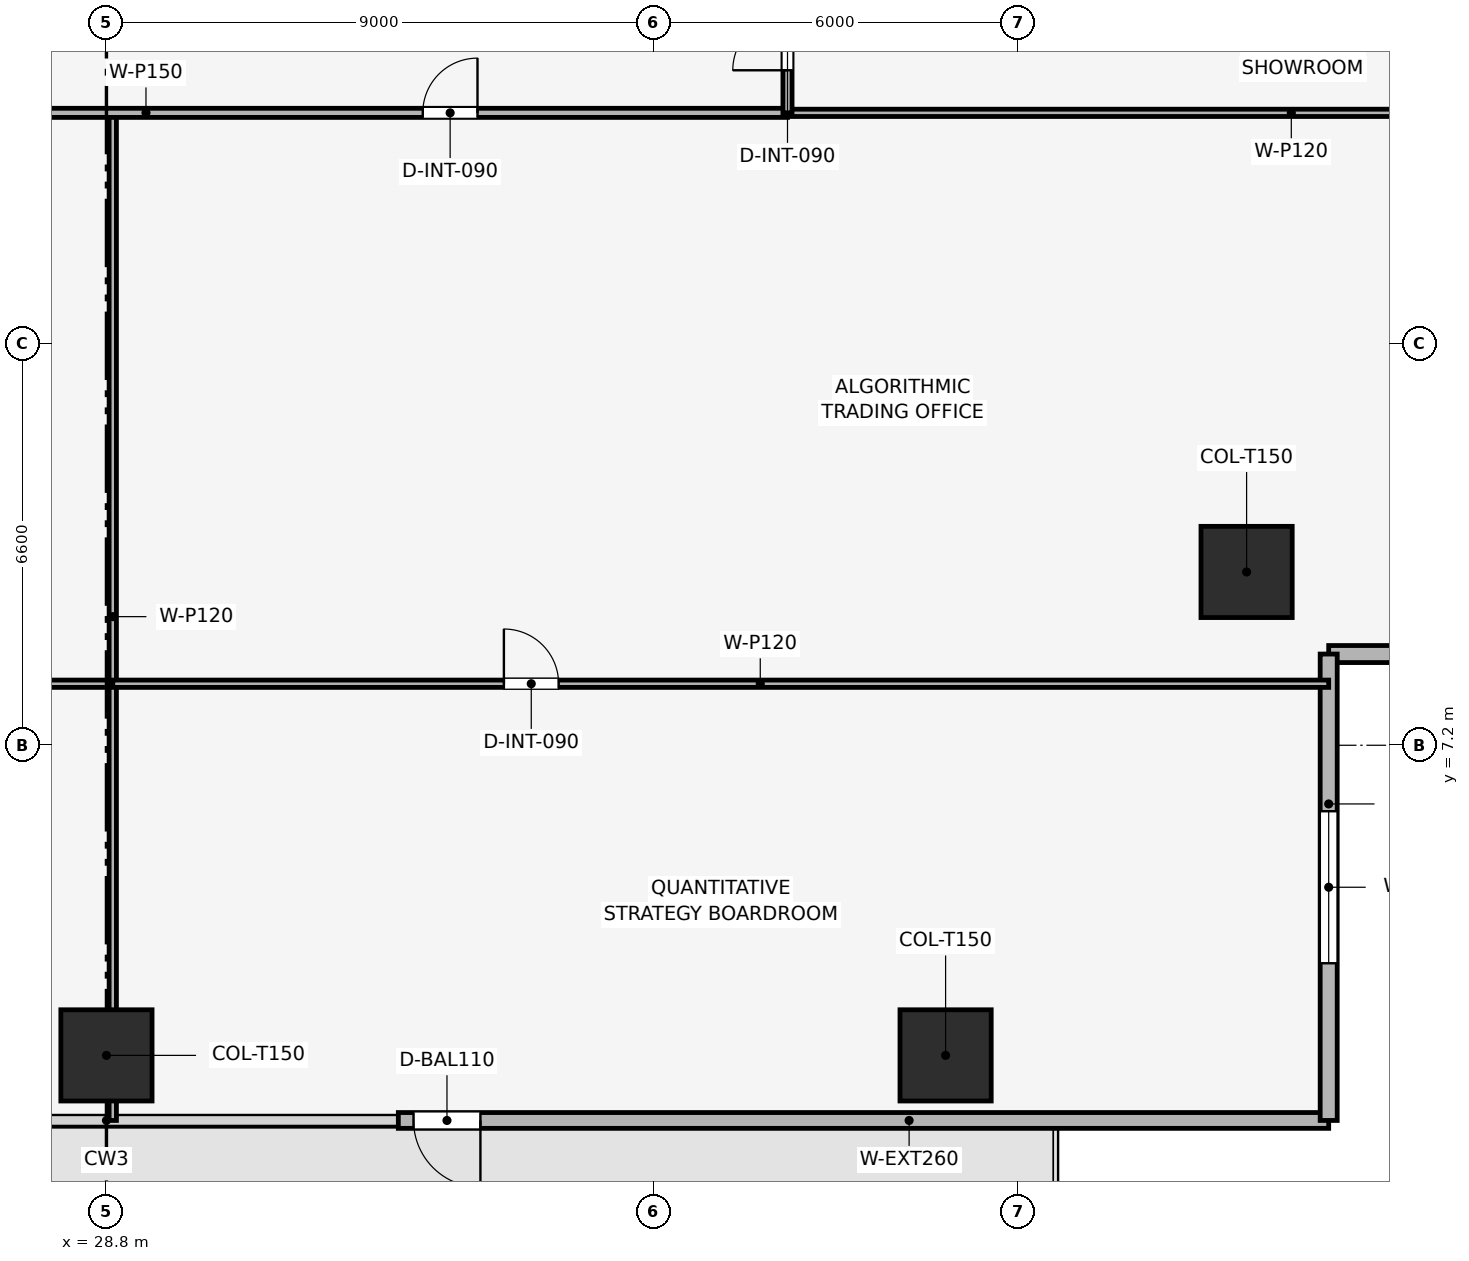
"""IFC4 building model, lengths in metres.
Left out: names, types, materials, properties, quantities, classifications, styles, units other than length and angle.
Written with IfcOpenShell. Run it as: python <this file> out.ifc"""

import sys

from ifc_helpers import new_model, si_unit, direction, frame, frame_2d, origin, origin_2d, place, context, subcontext, project, spatial, rectangle, extrude, element, fill, save


model = new_model("IFC4")
c1 = context("Model", 3, precision=1e-05, world=origin(), true_north=direction((0.0, 1.0)))
c2 = subcontext(c1, "Body", "Model", "MODEL_VIEW")
j1 = project(units=[si_unit("LENGTHUNIT", "METRE"), si_unit("PLANEANGLEUNIT", "RADIAN")], contexts=[c1])
p1 = place(None, origin())
s1 = spatial("IfcSite", under=j1, at=p1, CompositionType="ELEMENT")
p2 = place(p1, origin())
s2 = spatial("IfcBuilding", under=s1, at=p2, CompositionType="ELEMENT")
p3 = place(p2, frame((0.0, 0.0, 49.5)))
s3 = spatial("IfcBuildingStorey", under=s2, at=p3, CompositionType="ELEMENT", Elevation=49.5)
for number, where, z_axis, x_axis in (
    (1, (28.8, 2.1, 0.003), (0.0, 0.0, 1.0), (1.0, 0.0, 0.0)),
    (2, (42.6, 2.1, 0.003), (0.0, 0.0, 1.0), (1.0, 0.0, 0.0)),
    (3, (47.55, 10.05, 0.003), (0.0, 0.0, 1.0), (1.0, 0.0, 0.0)),
):
    element("IfcColumn", number, at=place(p3, frame(where, z_axis=z_axis, x_axis=x_axis)), inside=s3, PredefinedType="COLUMN", context=c2, shape_type="SweptSolid", body=[
        extrude(rectangle(XDim=1.5, YDim=1.5, at=origin_2d()), origin(), (0.0, 0.0, 1.0), 3.644),
    ])
p4 = place(p3, frame((48.9, 1.03, 0.0), z_axis=(0.0, 0.0, 1.0), x_axis=(-1.0, 0.0, 0.0)))
e4 = element("IfcWall", 4, at=p4, inside=s3, PredefinedType="SOLIDWALL", context=c2, shape_type="SweptSolid", body=[
    extrude(rectangle(XDim=15.3, YDim=0.26, at=frame_2d((7.65, 0.0))), origin(), (0.0, 0.0, 1.0), 3.65),
])
p5 = place(p4, frame((13.95, 0.0, 0.0)))
e5 = element("IfcOpeningElement", 5, at=p5, cuts=e4, PredefinedType="OPENING", context=c2, shape_type="SweptSolid", body=[
    extrude(rectangle(XDim=1.1, YDim=2.2, at=frame_2d((0.55, 1.1))), frame((0.0, 0.14, 0.0), z_axis=(0.0, -1.0, 0.0), x_axis=(1.0, 0.0, 0.0)), (0.0, 0.0, 1.0), 0.28),
])
p6 = place(p3, frame((56.57, 8.7, 0.0), z_axis=(0.0, 0.0, 1.0), x_axis=(-1.0, 0.0, 0.0)))
e6 = element("IfcWall", 6, at=p6, inside=s3, PredefinedType="SOLIDWALL", context=c2, shape_type="SweptSolid", body=[
    extrude(rectangle(XDim=7.67, YDim=0.28, at=frame_2d((3.835, 0.0))), origin(), (0.0, 0.0, 1.0), 3.65),
])
p7 = place(p6, frame((2.585, 0.0, 0.9)))
e7 = element("IfcOpeningElement", 7, at=p7, cuts=e6, PredefinedType="OPENING", context=c2, shape_type="SweptSolid", body=[
    extrude(rectangle(XDim=2.5, YDim=1.9, at=frame_2d((1.25, 0.95))), frame((0.0, 0.15, 0.0), z_axis=(0.0, -1.0, 0.0), x_axis=(1.0, 0.0, 0.0)), (0.0, 0.0, 1.0), 0.3),
])
p8 = place(p3, frame((48.9, 8.7, 0.0), z_axis=(0.0, 0.0, 1.0), x_axis=(0.0, -1.0, 0.0)))
e8 = element("IfcWall", 8, at=p8, inside=s3, PredefinedType="SOLIDWALL", context=c2, shape_type="SweptSolid", body=[
    extrude(rectangle(XDim=7.67, YDim=0.28, at=frame_2d((3.835, 0.0))), origin(), (0.0, 0.0, 1.0), 3.65),
])
p9 = place(p8, frame((2.585, 0.0, 0.9)))
e9 = element("IfcOpeningElement", 9, at=p9, cuts=e8, PredefinedType="OPENING", context=c2, shape_type="SweptSolid", body=[
    extrude(rectangle(XDim=2.5, YDim=1.9, at=frame_2d((1.25, 0.95))), frame((0.0, 0.15, 0.0), z_axis=(0.0, -1.0, 0.0), x_axis=(1.0, 0.0, 0.0)), (0.0, 0.0, 1.0), 0.3),
])
p10 = place(p3, frame((19.9, 8.212, 0.0), z_axis=(0.0, 0.0, 1.0), x_axis=(1.0, 0.0, 0.0)))
e10 = element("IfcWall", 10, at=p10, inside=s3, PredefinedType="PARTITIONING", context=c2, shape_type="SweptSolid", body=[
    extrude(rectangle(XDim=9.004, YDim=0.12, at=frame_2d((4.502, 0.0))), origin(), (0.0, 0.0, 1.0), 3.085),
])
p11 = place(p10, frame((1.484, 0.0, 0.0)))
e11 = element("IfcOpeningElement", 11, at=p11, cuts=e10, PredefinedType="OPENING", context=c2, shape_type="SweptSolid", body=[
    extrude(rectangle(XDim=0.9, YDim=2.1, at=frame_2d((0.45, 1.05))), frame((0.0, 0.07, 0.0), z_axis=(0.0, -1.0, 0.0), x_axis=(1.0, 0.0, 0.0)), (0.0, 0.0, 1.0), 0.14),
])
p12 = place(p3, frame((28.904, 1.03, 0.0), z_axis=(0.0, 0.0, 1.0), x_axis=(0.0, 1.0, 0.0)))
e12 = element("IfcWall", 12, at=p12, inside=s3, PredefinedType="PARTITIONING", context=c2, shape_type="SweptSolid", body=[
    extrude(rectangle(XDim=16.57, YDim=0.12, at=frame_2d((8.285, 0.0))), origin(), (0.0, 0.0, 1.0), 3.085),
])
p13 = place(p3, frame((28.904, 8.212, 0.0), z_axis=(0.0, 0.0, 1.0), x_axis=(1.0, 0.0, 0.0)))
e13 = element("IfcWall", 13, at=p13, inside=s3, PredefinedType="PARTITIONING", context=c2, shape_type="SweptSolid", body=[
    extrude(rectangle(XDim=19.996, YDim=0.12, at=frame_2d((9.998, 0.0))), origin(), (0.0, 0.0, 1.0), 2.935),
])
p14 = place(p13, frame((6.432, 0.0, 0.0)))
e14 = element("IfcOpeningElement", 14, at=p14, cuts=e13, PredefinedType="OPENING", context=c2, shape_type="SweptSolid", body=[
    extrude(rectangle(XDim=0.9, YDim=2.1, at=frame_2d((0.45, 1.05))), frame((0.0, 0.07, 0.0), z_axis=(0.0, -1.0, 0.0), x_axis=(1.0, 0.0, 0.0)), (0.0, 0.0, 1.0), 0.14),
])
p15 = place(p3, frame((40.0, 17.6, 0.0), z_axis=(0.0, 0.0, 1.0), x_axis=(1.0, 0.0, 0.0)))
e15 = element("IfcWall", 15, at=p15, inside=s3, PredefinedType="PARTITIONING", context=c2, shape_type="SweptSolid", body=[
    extrude(rectangle(XDim=16.57, YDim=0.12, at=frame_2d((8.285, 0.0))), origin(), (0.0, 0.0, 1.0), 2.935),
])
p16 = place(p3, frame((17.6, 17.6, 0.0), z_axis=(0.0, 0.0, 1.0), x_axis=(1.0, 0.0, 0.0)))
e16 = element("IfcWall", 16, at=p16, inside=s3, PredefinedType="PARTITIONING", context=c2, shape_type="SweptSolid", body=[
    extrude(rectangle(XDim=22.4, YDim=0.15, at=frame_2d((11.2, 0.0))), origin(), (0.0, 0.0, 1.0), 3.085),
])
p17 = place(p16, frame((0.7, 0.0, 0.0)))
e17 = element("IfcOpeningElement", 17, at=p17, cuts=e16, PredefinedType="OPENING", context=c2, shape_type="SweptSolid", body=[
    extrude(rectangle(XDim=0.9, YDim=2.1, at=frame_2d((0.45, 1.05))), frame((0.0, 0.085, 0.0), z_axis=(0.0, -1.0, 0.0), x_axis=(1.0, 0.0, 0.0)), (0.0, 0.0, 1.0), 0.17),
])
p18 = place(p16, frame((6.352, 0.0, 0.0)))
e18 = element("IfcOpeningElement", 18, at=p18, cuts=e16, PredefinedType="OPENING", context=c2, shape_type="SweptSolid", body=[
    extrude(rectangle(XDim=0.9, YDim=2.1, at=frame_2d((0.45, 1.05))), frame((0.0, 0.085, 0.0), z_axis=(0.0, -1.0, 0.0), x_axis=(1.0, 0.0, 0.0)), (0.0, 0.0, 1.0), 0.17),
])
p19 = place(p16, frame((16.402, 0.0, 0.0)))
e19 = element("IfcOpeningElement", 19, at=p19, cuts=e16, PredefinedType="OPENING", context=c2, shape_type="SweptSolid", body=[
    extrude(rectangle(XDim=0.9, YDim=2.1, at=frame_2d((0.45, 1.05))), frame((0.0, 0.085, 0.0), z_axis=(0.0, -1.0, 0.0), x_axis=(1.0, 0.0, 0.0)), (0.0, 0.0, 1.0), 0.17),
])
p20 = place(p3, frame((40.0, 17.6, 0.0), z_axis=(0.0, 0.0, 1.0), x_axis=(0.0, 1.0, 0.0)))
e20 = element("IfcWall", 20, at=p20, inside=s3, PredefinedType="PARTITIONING", context=c2, shape_type="SweptSolid", body=[
    extrude(rectangle(XDim=22.4, YDim=0.15, at=frame_2d((11.2, 0.0))), origin(), (0.0, 0.0, 1.0), 3.085),
])
p21 = place(p20, frame((0.7, 0.0, 0.0)))
e21 = element("IfcOpeningElement", 21, at=p21, cuts=e20, PredefinedType="OPENING", context=c2, shape_type="SweptSolid", body=[
    extrude(rectangle(XDim=0.9, YDim=2.1, at=frame_2d((0.45, 1.05))), frame((0.0, 0.085, 0.0), z_axis=(0.0, -1.0, 0.0), x_axis=(1.0, 0.0, 0.0)), (0.0, 0.0, 1.0), 0.17),
])
p22 = place(p20, frame((4.927, 0.0, 0.0)))
e22 = element("IfcOpeningElement", 22, at=p22, cuts=e20, PredefinedType="OPENING", context=c2, shape_type="SweptSolid", body=[
    extrude(rectangle(XDim=0.9, YDim=2.1, at=frame_2d((0.45, 1.05))), frame((0.0, 0.085, 0.0), z_axis=(0.0, -1.0, 0.0), x_axis=(1.0, 0.0, 0.0)), (0.0, 0.0, 1.0), 0.17),
])
p23 = place(p20, frame((10.886, 0.0, 0.0)))
e23 = element("IfcOpeningElement", 23, at=p23, cuts=e20, PredefinedType="OPENING", context=c2, shape_type="SweptSolid", body=[
    extrude(rectangle(XDim=0.9, YDim=2.1, at=frame_2d((0.45, 1.05))), frame((0.0, 0.085, 0.0), z_axis=(0.0, -1.0, 0.0), x_axis=(1.0, 0.0, 0.0)), (0.0, 0.0, 1.0), 0.17),
])
p24 = place(p20, frame((17.859, 0.0, 0.0)))
e24 = element("IfcOpeningElement", 24, at=p24, cuts=e20, PredefinedType="OPENING", context=c2, shape_type="SweptSolid", body=[
    extrude(rectangle(XDim=0.9, YDim=2.1, at=frame_2d((0.45, 1.05))), frame((0.0, 0.085, 0.0), z_axis=(0.0, -1.0, 0.0), x_axis=(1.0, 0.0, 0.0)), (0.0, 0.0, 1.0), 0.17),
])
p25 = place(p5, origin())
e25 = element("IfcDoor", 25, at=p25, inside=s3, OperationType="SINGLE_SWING_LEFT", PredefinedType="DOOR", context=c2, shape_type="SweptSolid", body=[
    extrude(rectangle(XDim=1.1, YDim=2.2, at=frame_2d((0.55, 1.1))), frame((0.0, 0.025, 0.0), z_axis=(0.0, -1.0, 0.0), x_axis=(1.0, 0.0, 0.0)), (0.0, 0.0, 1.0), 0.05),
])
fill(e5, e25)
p26 = place(p9, origin())
e26 = element("IfcWindow", 26, at=p26, inside=s3, PartitioningType="SINGLE_PANEL", PredefinedType="WINDOW", context=c2, shape_type="SweptSolid", body=[
    extrude(rectangle(XDim=2.5, YDim=1.9, at=frame_2d((1.25, 0.95))), frame((0.0, 0.03, 0.0), z_axis=(0.0, -1.0, 0.0), x_axis=(1.0, 0.0, 0.0)), (0.0, 0.0, 1.0), 0.06),
])
fill(e9, e26)
p27 = place(p14, origin())
e27 = element("IfcDoor", 27, at=p27, inside=s3, OperationType="SINGLE_SWING_LEFT", PredefinedType="DOOR", context=c2, shape_type="SweptSolid", body=[
    extrude(rectangle(XDim=0.9, YDim=2.1, at=frame_2d((0.45, 1.05))), frame((0.0, 0.025, 0.0), z_axis=(0.0, -1.0, 0.0), x_axis=(1.0, 0.0, 0.0)), (0.0, 0.0, 1.0), 0.05),
])
fill(e14, e27)
p28 = place(p19, origin())
e28 = element("IfcDoor", 28, at=p28, inside=s3, OperationType="SINGLE_SWING_RIGHT", PredefinedType="DOOR", context=c2, shape_type="SweptSolid", body=[
    extrude(rectangle(XDim=0.9, YDim=2.1, at=frame_2d((0.45, 1.05))), frame((0.0, 0.025, 0.0), z_axis=(0.0, -1.0, 0.0), x_axis=(1.0, 0.0, 0.0)), (0.0, 0.0, 1.0), 0.05),
])
fill(e19, e28)
p29 = place(p21, origin())
e29 = element("IfcDoor", 29, at=p29, inside=s3, OperationType="SINGLE_SWING_LEFT", PredefinedType="DOOR", context=c2, shape_type="SweptSolid", body=[
    extrude(rectangle(XDim=0.9, YDim=2.1, at=frame_2d((0.45, 1.05))), frame((0.0, 0.025, 0.0), z_axis=(0.0, -1.0, 0.0), x_axis=(1.0, 0.0, 0.0)), (0.0, 0.0, 1.0), 0.05),
])
fill(e21, e29)
save(model, sys.argv[1])
